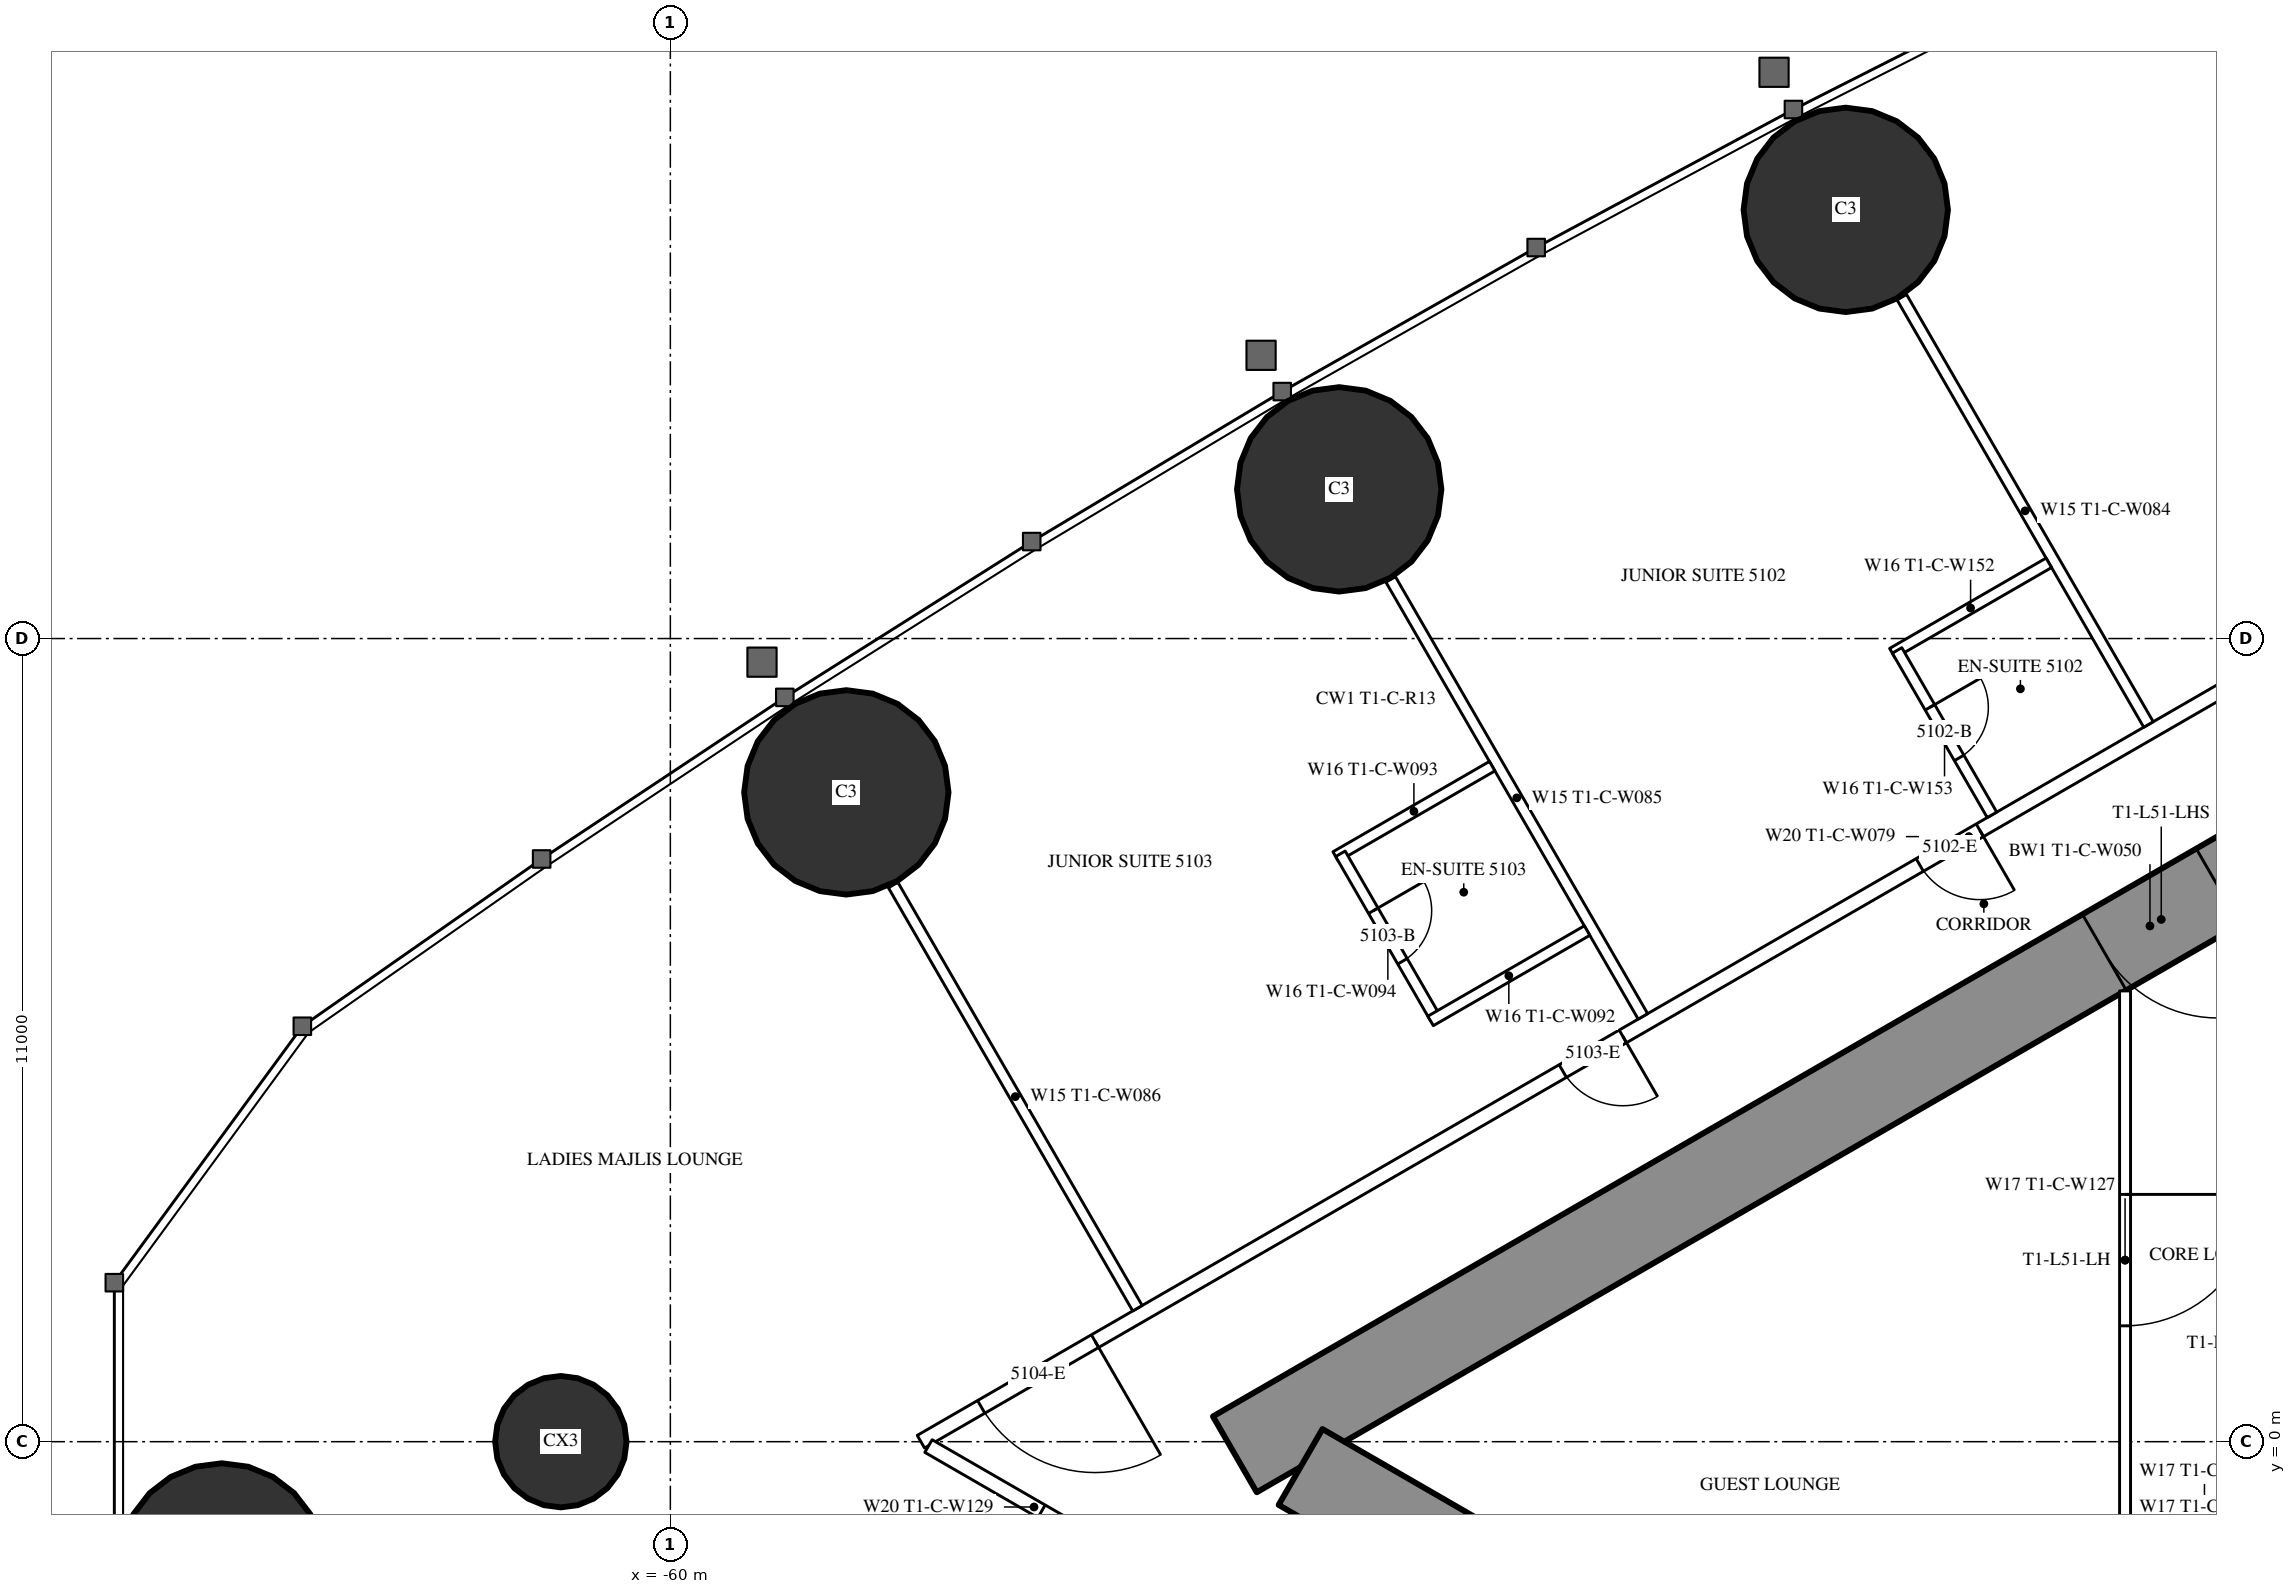
"""IFC4 building model, lengths in metres.
Left out: names, types, materials, properties, quantities, classifications, styles, units other than length and angle.
Written with IfcOpenShell. Run it as: python <this file> out.ifc"""

import sys

from ifc_helpers import new_model, si_unit, direction, frame, frame_2d, origin, origin_2d, place, context, subcontext, project, spatial, rectangle, circle, extrude, element, fill, save


model = new_model("IFC4")
c1 = context("Model", 3, precision=1e-05, world=origin(), true_north=direction((0.0, 1.0)))
c2 = subcontext(c1, "Body", "Model", "MODEL_VIEW")
j1 = project(units=[si_unit("LENGTHUNIT", "METRE"), si_unit("PLANEANGLEUNIT", "RADIAN")], contexts=[c1])
p1 = place(None, origin())
s1 = spatial("IfcSite", under=j1, at=p1, CompositionType="ELEMENT")
p2 = place(p1, origin())
s2 = spatial("IfcBuilding", under=s1, at=p2, CompositionType="ELEMENT")
p3 = place(p2, frame((0.0, 0.0, 191.3)))
s3 = spatial("IfcBuildingStorey", under=s2, at=p3, CompositionType="ELEMENT", Elevation=191.3)
for number, where, z_axis, x_axis in (
    (1, (-66.143, -1.695, 0.0), (0.0, 0.0, 1.0), (1.0, 0.0, 0.0)),
    (2, (-43.9, 16.871, 0.0), (0.0, 0.0, 1.0), (1.0, 0.0, 0.0)),
    (3, (-50.839, 13.043, 0.0), (0.0, 0.0, 1.0), (1.0, 0.0, 0.0)),
    (4, (-57.59, 8.893, 0.0), (0.0, 0.0, 1.0), (1.0, 0.0, 0.0)),
):
    element("IfcColumn", number, at=place(p3, frame(where, z_axis=z_axis, x_axis=x_axis)), inside=s3, PredefinedType="COLUMN", context=c2, shape_type="SweptSolid", body=[
        extrude(circle(Radius=1.4, at=origin_2d()), origin(), (0.0, 0.0, 1.0), 3.5),
    ])
p4 = place(p3, frame((-61.5, 0.0, 0.0), z_axis=(0.0, 0.0, 1.0), x_axis=(1.0, 0.0, 0.0)))
e5 = element("IfcColumn", 5, at=p4, inside=s3, PredefinedType="COLUMN", context=c2, shape_type="SweptSolid", body=[
    extrude(circle(Radius=0.9, at=origin_2d()), origin(), (0.0, 0.0, 1.0), 3.5),
])
p5 = place(p3, frame((-27.2, 14.3, 0.0), z_axis=(0.0, 0.0, 1.0), x_axis=(-0.866026593062, -0.499997940104, 0.0)))
e6 = element("IfcWall", 6, at=p5, inside=s3, PredefinedType="SHEAR", context=c2, shape_type="SweptSolid", body=[
    extrude(rectangle(XDim=28.946, YDim=1.2, at=frame_2d((14.473, 0.0))), origin(), (0.0, 0.0, 1.0), 3.5),
])
p6 = place(p5, frame((4.6, 0.0, 0.0)))
e7 = element("IfcOpeningElement", 7, at=p6, cuts=e6, PredefinedType="OPENING", context=c2, shape_type="SweptSolid", body=[
    extrude(rectangle(XDim=1.0, YDim=2.2, at=frame_2d((0.5, 1.1))), frame((0.0, 0.61, 0.0), z_axis=(0.0, -1.0, 0.0), x_axis=(1.0, 0.0, 0.0)), (0.0, 0.0, 1.0), 1.22),
])
p7 = place(p5, frame((13.395, 0.0, 0.0)))
e8 = element("IfcOpeningElement", 8, at=p7, cuts=e6, PredefinedType="OPENING", context=c2, shape_type="SweptSolid", body=[
    extrude(rectangle(XDim=1.8, YDim=2.2, at=frame_2d((0.9, 1.1))), frame((0.0, 0.61, 0.0), z_axis=(0.0, -1.0, 0.0), x_axis=(1.0, 0.0, 0.0)), (0.0, 0.0, 1.0), 1.22),
])
p8 = place(p3, frame((-27.2, -14.3, 0.0), z_axis=(0.0, 0.0, 1.0), x_axis=(-0.866024021859, 0.500002393557, 0.0)))
e9 = element("IfcWall", 9, at=p8, inside=s3, PredefinedType="SHEAR", context=c2, shape_type="SweptSolid", body=[
    extrude(rectangle(XDim=27.907, YDim=1.2, at=frame_2d((13.954, 0.0))), origin(), (0.0, 0.0, 1.0), 3.5),
])
p9 = place(p8, frame((4.6, 0.0, 0.0)))
e10 = element("IfcOpeningElement", 10, at=p9, cuts=e9, PredefinedType="OPENING", context=c2, shape_type="SweptSolid", body=[
    extrude(rectangle(XDim=1.0, YDim=2.2, at=frame_2d((0.5, 1.1))), frame((0.0, 0.61, 0.0), z_axis=(0.0, -1.0, 0.0), x_axis=(1.0, 0.0, 0.0)), (0.0, 0.0, 1.0), 1.22),
])
p10 = place(p8, frame((13.395, 0.0, 0.0)))
e11 = element("IfcOpeningElement", 11, at=p10, cuts=e9, PredefinedType="OPENING", context=c2, shape_type="SweptSolid", body=[
    extrude(rectangle(XDim=1.8, YDim=2.2, at=frame_2d((0.9, 1.1))), frame((0.0, 0.61, 0.0), z_axis=(0.0, -1.0, 0.0), x_axis=(1.0, 0.0, 0.0)), (0.0, 0.0, 1.0), 1.22),
])
p11 = place(p3, frame((-27.86, 16.575, 0.0), z_axis=(0.0, 0.0, 1.0), x_axis=(-0.866025533911, -0.499999774615, 0.0)))
e12 = element("IfcWall", 12, at=p11, inside=s3, PredefinedType="PARTITIONING", context=c2, shape_type="SweptSolid", body=[
    extrude(rectangle(XDim=33.149, YDim=0.2, at=frame_2d((16.575, 0.0))), origin(), (0.0, 0.0, 1.0), 3.25),
])
p12 = place(p11, frame((3.75, 0.0, 0.0)))
e13 = element("IfcOpeningElement", 13, at=p12, cuts=e12, PredefinedType="OPENING", context=c2, shape_type="SweptSolid", body=[
    extrude(rectangle(XDim=1.0, YDim=2.2, at=frame_2d((0.5, 1.1))), frame((0.0, 0.11, 0.0), z_axis=(0.0, -1.0, 0.0), x_axis=(1.0, 0.0, 0.0)), (0.0, 0.0, 1.0), 0.22),
])
p13 = place(p11, frame((16.402, 0.0, 0.0)))
e14 = element("IfcOpeningElement", 14, at=p13, cuts=e12, PredefinedType="OPENING", context=c2, shape_type="SweptSolid", body=[
    extrude(rectangle(XDim=0.95, YDim=2.2, at=frame_2d((0.475, 1.1))), frame((0.0, 0.11, 0.0), z_axis=(0.0, -1.0, 0.0), x_axis=(1.0, 0.0, 0.0)), (0.0, 0.0, 1.0), 0.22),
])
p14 = place(p11, frame((22.047, 0.0, 0.0)))
e15 = element("IfcOpeningElement", 15, at=p14, cuts=e12, PredefinedType="OPENING", context=c2, shape_type="SweptSolid", body=[
    extrude(rectangle(XDim=0.95, YDim=2.2, at=frame_2d((0.475, 1.1))), frame((0.0, 0.11, 0.0), z_axis=(0.0, -1.0, 0.0), x_axis=(1.0, 0.0, 0.0)), (0.0, 0.0, 1.0), 0.22),
])
p15 = place(p11, frame((30.396, 0.0, 0.0)))
e16 = element("IfcOpeningElement", 16, at=p15, cuts=e12, PredefinedType="OPENING", context=c2, shape_type="SweptSolid", body=[
    extrude(rectangle(XDim=1.8, YDim=2.2, at=frame_2d((0.9, 1.1))), frame((0.0, 0.11, 0.0), z_axis=(0.0, -1.0, 0.0), x_axis=(1.0, 0.0, 0.0)), (0.0, 0.0, 1.0), 0.22),
])
p16 = place(p3, frame((-39.754, 9.823, 0.0), z_axis=(0.0, 0.0, 1.0), x_axis=(-0.499997670926, 0.866026748472, 0.0)))
e17 = element("IfcWall", 17, at=p16, inside=s3, PredefinedType="PARTITIONING", context=c2, shape_type="SweptSolid", body=[
    extrude(rectangle(XDim=6.757, YDim=0.15, at=frame_2d((3.379, 0.0))), origin(), (0.0, 0.0, 1.0), 2.3),
])
p17 = place(p3, frame((-46.679, 5.825, 0.0), z_axis=(0.0, 0.0, 1.0), x_axis=(-0.500006839597, 0.866021454905, 0.0)))
e18 = element("IfcWall", 18, at=p17, inside=s3, PredefinedType="PARTITIONING", context=c2, shape_type="SweptSolid", body=[
    extrude(rectangle(XDim=6.911, YDim=0.15, at=frame_2d((3.456, 0.0))), origin(), (0.0, 0.0, 1.0), 2.3),
])
p18 = place(p3, frame((-53.602, 1.828, 0.0), z_axis=(0.0, 0.0, 1.0), x_axis=(-0.49999191814, 0.866030069798, 0.0)))
e19 = element("IfcWall", 19, at=p18, inside=s3, PredefinedType="PARTITIONING", context=c2, shape_type="SweptSolid", body=[
    extrude(rectangle(XDim=6.692, YDim=0.15, at=frame_2d((3.346, 0.0))), origin(), (0.0, 0.0, 1.0), 2.3),
])
p19 = place(p3, frame((-53.574, -1.729, 0.0), z_axis=(0.0, 0.0, 1.0), x_axis=(-0.866019930389, 0.500009480079, 0.0)))
e20 = element("IfcWall", 20, at=p19, inside=s3, PredefinedType="PARTITIONING", context=c2, shape_type="SweptSolid", body=[
    extrude(rectangle(XDim=3.338, YDim=0.2, at=frame_2d((1.669, 0.0))), origin(), (0.0, 0.0, 1.0), 3.25),
])
p20 = place(p19, frame((0.6, 0.0, 0.0)))
e21 = element("IfcOpeningElement", 21, at=p20, cuts=e20, PredefinedType="OPENING", context=c2, shape_type="SweptSolid", body=[
    extrude(rectangle(XDim=0.95, YDim=2.2, at=frame_2d((0.475, 1.1))), frame((0.0, 0.11, 0.0), z_axis=(0.0, -1.0, 0.0), x_axis=(1.0, 0.0, 0.0)), (0.0, 0.0, 1.0), 0.22),
])
p21 = place(p3, frame((-41.119, 12.037, 0.0), z_axis=(0.0, 0.0, 1.0), x_axis=(-0.866073894602, -0.499916002032, 0.0)))
e22 = element("IfcWall", 22, at=p21, inside=s3, PredefinedType="PARTITIONING", context=c2, shape_type="SweptSolid", body=[
    extrude(rectangle(XDim=2.475, YDim=0.15, at=frame_2d((1.238, 0.0))), origin(), (0.0, 0.0, 1.0), 3.25),
])
p22 = place(p3, frame((-41.898, 8.585, 0.0), z_axis=(0.0, 0.0, 1.0), x_axis=(-0.500006934395, 0.866021400173, 0.0)))
e23 = element("IfcWall", 23, at=p22, inside=s3, PredefinedType="PARTITIONING", context=c2, shape_type="SweptSolid", body=[
    extrude(rectangle(XDim=2.6, YDim=0.15, at=frame_2d((1.3, 0.0))), origin(), (0.0, 0.0, 1.0), 3.25),
])
p23 = place(p22, frame((0.9, 0.0, 0.0)))
e24 = element("IfcOpeningElement", 24, at=p23, cuts=e23, PredefinedType="OPENING", context=c2, shape_type="SweptSolid", body=[
    extrude(rectangle(XDim=0.8, YDim=2.2, at=frame_2d((0.4, 1.1))), frame((0.0, 0.085, 0.0), z_axis=(0.0, -1.0, 0.0), x_axis=(1.0, 0.0, 0.0)), (0.0, 0.0, 1.0), 0.17),
])
p24 = place(p3, frame((-48.744, 9.252, 0.0), z_axis=(0.0, 0.0, 1.0), x_axis=(-0.866006523861, -0.500032699561, 0.0)))
e25 = element("IfcWall", 25, at=p24, inside=s3, PredefinedType="PARTITIONING", context=c2, shape_type="SweptSolid", body=[
    extrude(rectangle(XDim=2.475, YDim=0.15, at=frame_2d((1.237, 0.0))), origin(), (0.0, 0.0, 1.0), 3.25),
])
p25 = place(p3, frame((-49.522, 5.8, 0.0), z_axis=(0.0, 0.0, 1.0), x_axis=(-0.500006934395, 0.866021400173, 0.0)))
e26 = element("IfcWall", 26, at=p25, inside=s3, PredefinedType="PARTITIONING", context=c2, shape_type="SweptSolid", body=[
    extrude(rectangle(XDim=2.6, YDim=0.15, at=frame_2d((1.3, 0.0))), origin(), (0.0, 0.0, 1.0), 3.25),
])
p26 = place(p25, frame((0.9, 0.0, 0.0)))
e27 = element("IfcOpeningElement", 27, at=p26, cuts=e26, PredefinedType="OPENING", context=c2, shape_type="SweptSolid", body=[
    extrude(rectangle(XDim=0.8, YDim=2.2, at=frame_2d((0.4, 1.1))), frame((0.0, 0.085, 0.0), z_axis=(0.0, -1.0, 0.0), x_axis=(1.0, 0.0, 0.0)), (0.0, 0.0, 1.0), 0.17),
])
p27 = place(p3, frame((-47.444, 7.0, 0.0), z_axis=(0.0, 0.0, 1.0), x_axis=(-0.866006523861, -0.500032699561, 0.0)))
e28 = element("IfcWall", 28, at=p27, inside=s3, PredefinedType="PARTITIONING", context=c2, shape_type="SweptSolid", body=[
    extrude(rectangle(XDim=2.475, YDim=0.15, at=frame_2d((1.237, 0.0))), origin(), (0.0, 0.0, 1.0), 3.25),
])
p28 = place(p3, frame((-40.075, 6.174, 0.0), z_axis=(0.0, 0.0, 1.0), x_axis=(0.0, -1.0, 0.0)))
e29 = element("IfcWall", 29, at=p28, inside=s3, PredefinedType="PARTITIONING", context=c2, shape_type="SweptSolid", body=[
    extrude(rectangle(XDim=7.374, YDim=0.15, at=frame_2d((3.687, 0.0))), origin(), (0.0, 0.0, 1.0), 3.25),
])
p29 = place(p28, frame((2.787, 0.0, 0.0)))
e30 = element("IfcOpeningElement", 30, at=p29, cuts=e29, PredefinedType="OPENING", context=c2, shape_type="SweptSolid", body=[
    extrude(rectangle(XDim=1.8, YDim=2.2, at=frame_2d((0.9, 1.1))), frame((0.0, 0.085, 0.0), z_axis=(0.0, -1.0, 0.0), x_axis=(1.0, 0.0, 0.0)), (0.0, 0.0, 1.0), 0.17),
])
p30 = place(p23, origin())
e31 = element("IfcDoor", 31, at=p30, inside=s3, OperationType="SINGLE_SWING_RIGHT", PredefinedType="DOOR", context=c2, shape_type="SweptSolid", body=[
    extrude(rectangle(XDim=0.8, YDim=2.2, at=frame_2d((0.4, 1.1))), frame((0.0, 0.025, 0.0), z_axis=(0.0, -1.0, 0.0), x_axis=(1.0, 0.0, 0.0)), (0.0, 0.0, 1.0), 0.05),
])
fill(e24, e31)
p31 = place(p13, origin())
e32 = element("IfcDoor", 32, at=p31, inside=s3, OperationType="SINGLE_SWING_LEFT", PredefinedType="DOOR", context=c2, shape_type="SweptSolid", body=[
    extrude(rectangle(XDim=0.95, YDim=2.2, at=frame_2d((0.475, 1.1))), frame((0.0, 0.025, 0.0), z_axis=(0.0, -1.0, 0.0), x_axis=(1.0, 0.0, 0.0)), (0.0, 0.0, 1.0), 0.05),
])
fill(e14, e32)
p32 = place(p26, origin())
e33 = element("IfcDoor", 33, at=p32, inside=s3, OperationType="SINGLE_SWING_RIGHT", PredefinedType="DOOR", context=c2, shape_type="SweptSolid", body=[
    extrude(rectangle(XDim=0.8, YDim=2.2, at=frame_2d((0.4, 1.1))), frame((0.0, 0.025, 0.0), z_axis=(0.0, -1.0, 0.0), x_axis=(1.0, 0.0, 0.0)), (0.0, 0.0, 1.0), 0.05),
])
fill(e27, e33)
p33 = place(p14, origin())
e34 = element("IfcDoor", 34, at=p33, inside=s3, OperationType="SINGLE_SWING_LEFT", PredefinedType="DOOR", context=c2, shape_type="SweptSolid", body=[
    extrude(rectangle(XDim=0.95, YDim=2.2, at=frame_2d((0.475, 1.1))), frame((0.0, 0.025, 0.0), z_axis=(0.0, -1.0, 0.0), x_axis=(1.0, 0.0, 0.0)), (0.0, 0.0, 1.0), 0.05),
])
fill(e15, e34)
p34 = place(p15, origin())
e35 = element("IfcDoor", 35, at=p34, inside=s3, OperationType="DOUBLE_DOOR_SINGLE_SWING", PredefinedType="DOOR", context=c2, shape_type="SweptSolid", body=[
    extrude(rectangle(XDim=1.8, YDim=2.2, at=frame_2d((0.9, 1.1))), frame((0.0, 0.025, 0.0), z_axis=(0.0, -1.0, 0.0), x_axis=(1.0, 0.0, 0.0)), (0.0, 0.0, 1.0), 0.05),
])
fill(e16, e35)
p35 = place(p20, origin())
e36 = element("IfcDoor", 36, at=p35, inside=s3, OperationType="SINGLE_SWING_LEFT", PredefinedType="DOOR", context=c2, shape_type="SweptSolid", body=[
    extrude(rectangle(XDim=0.95, YDim=2.2, at=frame_2d((0.475, 1.1))), frame((0.0, 0.025, 0.0), z_axis=(0.0, -1.0, 0.0), x_axis=(1.0, 0.0, 0.0)), (0.0, 0.0, 1.0), 0.05),
])
fill(e21, e36)
p36 = place(p29, origin())
e37 = element("IfcDoor", 37, at=p36, inside=s3, OperationType="DOUBLE_DOOR_SINGLE_SWING", PredefinedType="DOOR", context=c2, shape_type="SweptSolid", body=[
    extrude(rectangle(XDim=1.8, YDim=2.2, at=frame_2d((0.9, 1.1))), frame((0.0, 0.025, 0.0), z_axis=(0.0, -1.0, 0.0), x_axis=(1.0, 0.0, 0.0)), (0.0, 0.0, 1.0), 0.05),
])
fill(e30, e37)
p37 = place(p7, origin())
e38 = element("IfcDoor", 38, at=p37, inside=s3, OperationType="DOUBLE_DOOR_SINGLE_SWING", PredefinedType="DOOR", context=c2, shape_type="SweptSolid", body=[
    extrude(rectangle(XDim=1.8, YDim=2.2, at=frame_2d((0.9, 1.1))), frame((0.0, 0.025, 0.0), z_axis=(0.0, -1.0, 0.0), x_axis=(1.0, 0.0, 0.0)), (0.0, 0.0, 1.0), 0.05),
])
fill(e8, e38)
save(model, sys.argv[1])
